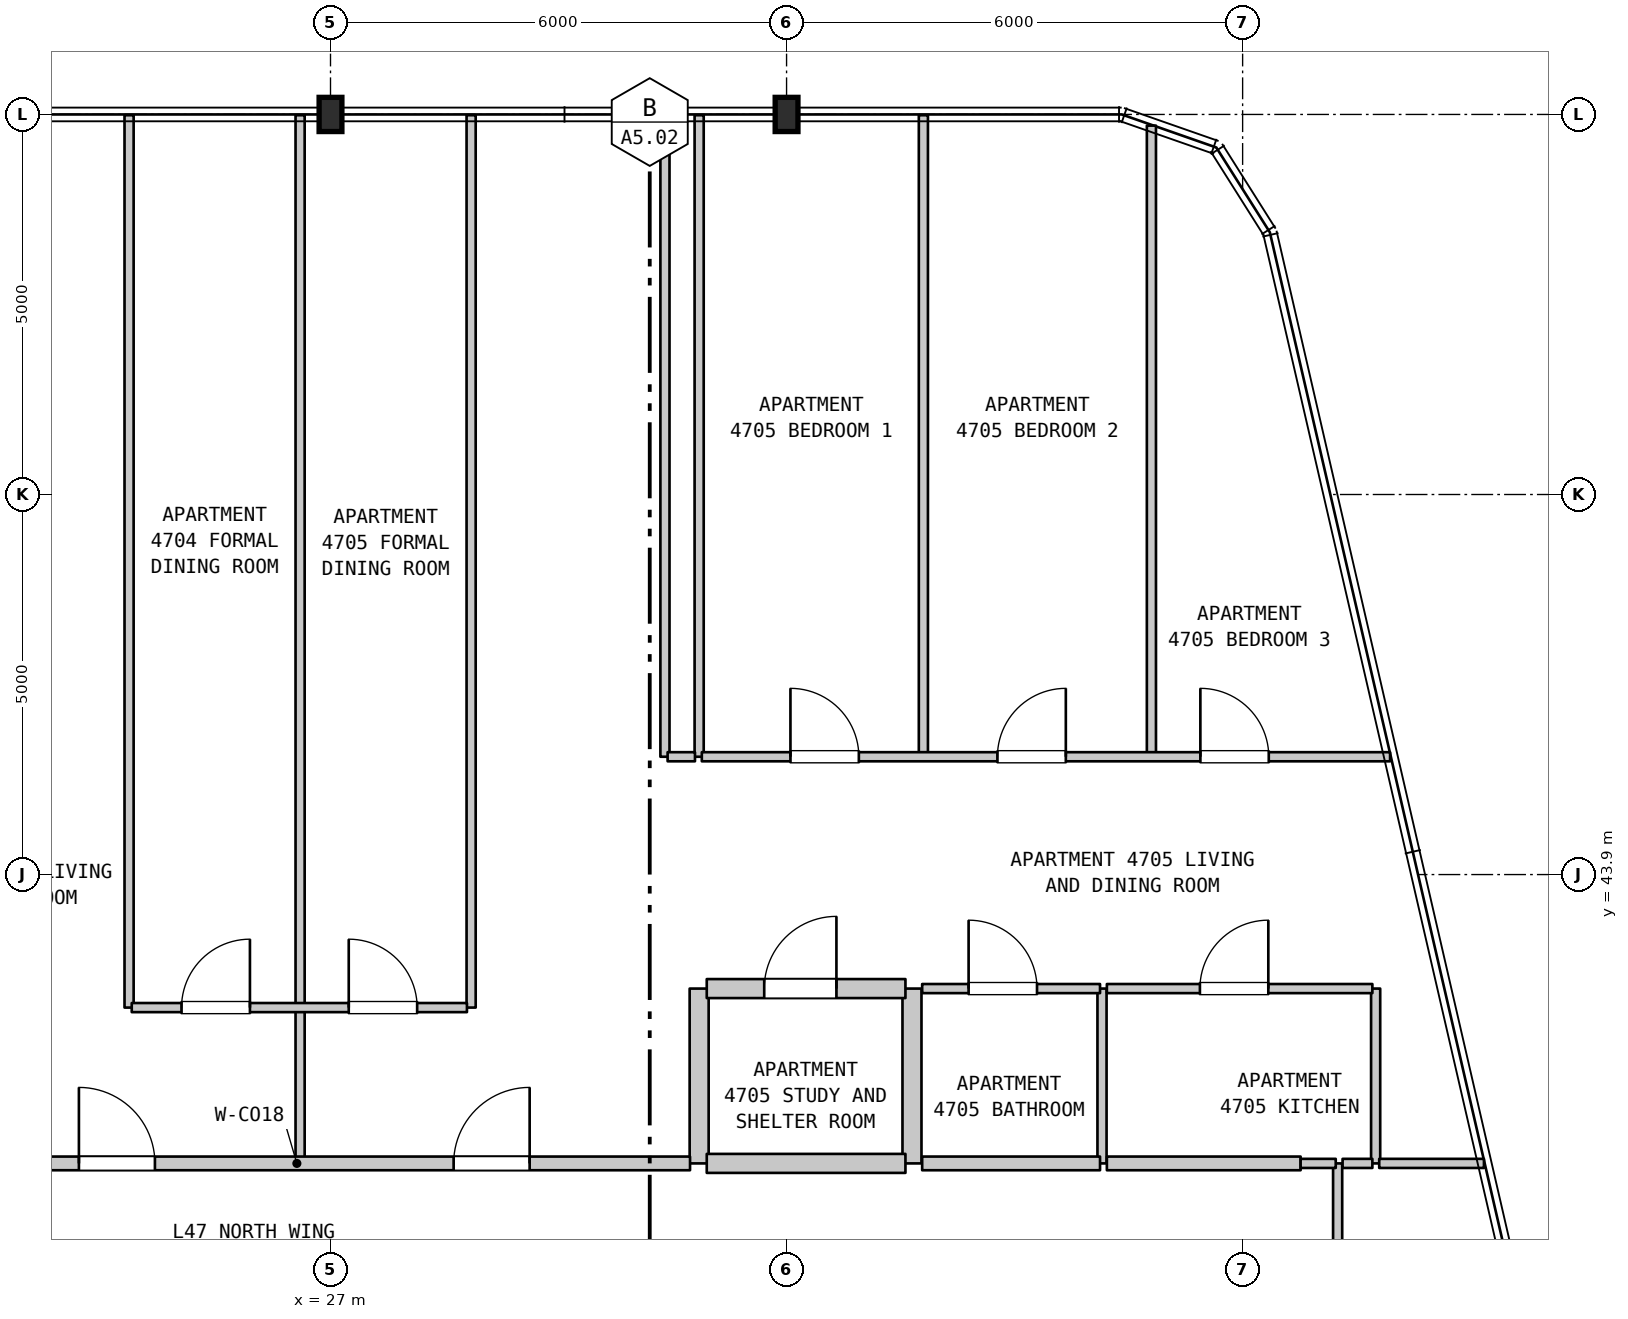
"""IFC4 building model, lengths in metres.
Left out: names, types, materials, properties, quantities, classifications, styles, units other than length and angle.
Written with IfcOpenShell. Run it as: python <this file> out.ifc"""

import sys

from ifc_helpers import new_model, si_unit, direction, frame, frame_2d, origin, origin_2d, place, context, subcontext, project, spatial, rectangle, i_section, extrude, element, fill, save


model = new_model("IFC4")
c1 = context("Model", 3, precision=1e-05, world=origin(), true_north=direction((0.0, 1.0)))
c2 = subcontext(c1, "Body", "Model", "MODEL_VIEW")
j1 = project(units=[si_unit("LENGTHUNIT", "METRE"), si_unit("PLANEANGLEUNIT", "RADIAN")], contexts=[c1])
p1 = place(None, origin())
s1 = spatial("IfcSite", under=j1, at=p1, CompositionType="ELEMENT")
p2 = place(p1, origin())
s2 = spatial("IfcBuilding", under=s1, at=p2, CompositionType="ELEMENT")
p3 = place(p2, frame((0.0, 0.0, 192.1)))
s3 = spatial("IfcBuildingStorey", under=s2, at=p3, CompositionType="ELEMENT", Elevation=192.1)
for number, where, z_axis, x_axis in (
    (1, (27.0, 53.9, 0.0), (0.0, 0.0, 1.0), (1.0, 0.0, 0.0)),
    (2, (33.0, 53.9, 0.0), (0.0, 0.0, 1.0), (1.0, 0.0, 0.0)),
):
    element("IfcColumn", number, at=place(p3, frame(where, z_axis=z_axis, x_axis=x_axis)), inside=s3, PredefinedType="COLUMN", context=c2, shape_type="SweptSolid", body=[
        extrude(i_section(OverallWidth=0.3, OverallDepth=0.45, WebThickness=0.014, FlangeThickness=0.026, FilletRadius=0.027, at=origin_2d()), origin(), (0.0, 0.0, 1.0), 3.7),
    ])
p4 = place(p3, frame((24.35, 42.15, 0.0), z_axis=(0.0, 0.0, 1.0), x_axis=(0.0, 1.0, 0.0)))
e3 = element("IfcWall", 3, at=p4, inside=s3, PredefinedType="PARTITIONING", context=c2, shape_type="SweptSolid", body=[
    extrude(rectangle(XDim=11.74, YDim=0.12, at=frame_2d((5.87, 0.0))), origin(), (0.0, 0.0, 1.0), 3.39),
])
p5 = place(p3, frame((26.6, 40.1, 0.0), z_axis=(0.0, 0.0, 1.0), x_axis=(0.0, 1.0, 0.0)))
e4 = element("IfcWall", 4, at=p5, inside=s3, PredefinedType="PARTITIONING", context=c2, shape_type="SweptSolid", body=[
    extrude(rectangle(XDim=2.05, YDim=0.12, at=frame_2d((1.025, 0.0))), origin(), (0.0, 0.0, 1.0), 3.39),
])
for number, where, z_axis, x_axis in (
    (5, (26.6, 42.15, 0.0), (0.0, 0.0, 1.0), (0.0, 1.0, 0.0)),
    (6, (28.85, 42.15, 0.0), (0.0, 0.0, 1.0), (0.0, 1.0, 0.0)),
):
    element("IfcWall", number, at=place(p3, frame(where, z_axis=z_axis, x_axis=x_axis)), inside=s3, PredefinedType="PARTITIONING", context=c2, shape_type="SweptSolid", body=[
        extrude(rectangle(XDim=11.74, YDim=0.12, at=frame_2d((5.87, 0.0))), origin(), (0.0, 0.0, 1.0), 3.39),
    ])
p6 = place(p3, frame((31.4, 45.45, 0.0), z_axis=(0.0, 0.0, 1.0), x_axis=(0.0, 1.0, 0.0)))
e7 = element("IfcWall", 7, at=p6, inside=s3, PredefinedType="PARTITIONING", context=c2, shape_type="SweptSolid", body=[
    extrude(rectangle(XDim=8.44, YDim=0.12, at=frame_2d((4.22, 0.0))), origin(), (0.0, 0.0, 1.0), 3.39),
])
p7 = place(p3, frame((31.85, 40.1, 0.0), z_axis=(0.0, 0.0, 1.0), x_axis=(0.0, 1.0, 0.0)))
e8 = element("IfcWall", 8, at=p7, inside=s3, PredefinedType="STANDARD", context=c2, shape_type="SweptSolid", body=[
    extrude(rectangle(XDim=2.3, YDim=0.25, at=frame_2d((1.15, 0.0))), origin(), (0.0, 0.0, 1.0), 3.39),
])
p8 = place(p3, frame((31.85, 45.45, 0.0), z_axis=(0.0, 0.0, 1.0), x_axis=(0.0, 1.0, 0.0)))
e9 = element("IfcWall", 9, at=p8, inside=s3, PredefinedType="PARTITIONING", context=c2, shape_type="SweptSolid", body=[
    extrude(rectangle(XDim=8.44, YDim=0.12, at=frame_2d((4.22, 0.0))), origin(), (0.0, 0.0, 1.0), 3.39),
])
p9 = place(p3, frame((34.65, 40.1, 0.0), z_axis=(0.0, 0.0, 1.0), x_axis=(0.0, 1.0, 0.0)))
e10 = element("IfcWall", 10, at=p9, inside=s3, PredefinedType="STANDARD", context=c2, shape_type="SweptSolid", body=[
    extrude(rectangle(XDim=2.3, YDim=0.25, at=frame_2d((1.15, 0.0))), origin(), (0.0, 0.0, 1.0), 3.39),
])
p10 = place(p3, frame((34.8, 45.45, 0.0), z_axis=(0.0, 0.0, 1.0), x_axis=(0.0, 1.0, 0.0)))
e11 = element("IfcWall", 11, at=p10, inside=s3, PredefinedType="PARTITIONING", context=c2, shape_type="SweptSolid", body=[
    extrude(rectangle(XDim=8.44, YDim=0.12, at=frame_2d((4.22, 0.0))), origin(), (0.0, 0.0, 1.0), 3.39),
])
p11 = place(p3, frame((37.15, 40.1, 0.0), z_axis=(0.0, 0.0, 1.0), x_axis=(0.0, 1.0, 0.0)))
e12 = element("IfcWall", 12, at=p11, inside=s3, PredefinedType="PARTITIONING", context=c2, shape_type="SweptSolid", body=[
    extrude(rectangle(XDim=2.3, YDim=0.12, at=frame_2d((1.15, 0.0))), origin(), (0.0, 0.0, 1.0), 3.39),
])
p12 = place(p3, frame((37.8, 45.45, 0.0), z_axis=(0.0, 0.0, 1.0), x_axis=(0.0, 1.0, 0.0)))
e13 = element("IfcWall", 13, at=p12, inside=s3, PredefinedType="PARTITIONING", context=c2, shape_type="SweptSolid", body=[
    extrude(rectangle(XDim=8.303, YDim=0.12, at=frame_2d((4.151, 0.0))), origin(), (0.0, 0.0, 1.0), 3.39),
])
p13 = place(p3, frame((40.25, 37.9, 0.0), z_axis=(0.0, 0.0, 1.0), x_axis=(0.0, 1.0, 0.0)))
e14 = element("IfcWall", 14, at=p13, inside=s3, PredefinedType="PARTITIONING", context=c2, shape_type="SweptSolid", body=[
    extrude(rectangle(XDim=2.2, YDim=0.12, at=frame_2d((1.1, 0.0))), origin(), (0.0, 0.0, 1.0), 3.39),
])
p14 = place(p3, frame((40.75, 40.1, 0.0), z_axis=(0.0, 0.0, 1.0), x_axis=(0.0, 1.0, 0.0)))
e15 = element("IfcWall", 15, at=p14, inside=s3, PredefinedType="PARTITIONING", context=c2, shape_type="SweptSolid", body=[
    extrude(rectangle(XDim=2.3, YDim=0.12, at=frame_2d((1.15, 0.0))), origin(), (0.0, 0.0, 1.0), 3.39),
])
p15 = place(p3, frame((21.385, 40.1, 0.0), z_axis=(0.0, 0.0, 1.0), x_axis=(1.0, 0.0, 0.0)))
e16 = element("IfcWall", 16, at=p15, inside=s3, PredefinedType="STANDARD", context=c2, shape_type="SweptSolid", body=[
    extrude(rectangle(XDim=10.345, YDim=0.18, at=frame_2d((5.172, 0.0))), origin(), (0.0, 0.0, 1.0), 3.39),
])
p16 = place(p15, frame((2.305, 0.0, 0.0)))
e17 = element("IfcOpeningElement", 17, at=p16, cuts=e16, PredefinedType="OPENING", context=c2, shape_type="SweptSolid", body=[
    extrude(rectangle(XDim=1.0, YDim=2.15, at=frame_2d((0.5, 1.075))), frame((0.0, 0.1, 0.0), z_axis=(0.0, -1.0, 0.0), x_axis=(1.0, 0.0, 0.0)), (0.0, 0.0, 1.0), 0.2),
])
p17 = place(p15, frame((7.235, 0.0, 0.0)))
e18 = element("IfcOpeningElement", 18, at=p17, cuts=e16, PredefinedType="OPENING", context=c2, shape_type="SweptSolid", body=[
    extrude(rectangle(XDim=1.0, YDim=2.15, at=frame_2d((0.5, 1.075))), frame((0.0, 0.1, 0.0), z_axis=(0.0, -1.0, 0.0), x_axis=(1.0, 0.0, 0.0)), (0.0, 0.0, 1.0), 0.2),
])
p18 = place(p3, frame((31.95, 40.1, 0.0), z_axis=(0.0, 0.0, 1.0), x_axis=(1.0, 0.0, 0.0)))
e19 = element("IfcWall", 19, at=p18, inside=s3, PredefinedType="STANDARD", context=c2, shape_type="SweptSolid", body=[
    extrude(rectangle(XDim=2.614, YDim=0.25, at=frame_2d((1.307, 0.0))), origin(), (0.0, 0.0, 1.0), 3.39),
])
p19 = place(p3, frame((34.784, 40.1, 0.0), z_axis=(0.0, 0.0, 1.0), x_axis=(1.0, 0.0, 0.0)))
e20 = element("IfcWall", 20, at=p19, inside=s3, PredefinedType="STANDARD", context=c2, shape_type="SweptSolid", body=[
    extrude(rectangle(XDim=2.34, YDim=0.18, at=frame_2d((1.17, 0.0))), origin(), (0.0, 0.0, 1.0), 3.39),
])
p20 = place(p3, frame((37.214, 40.1, 0.0), z_axis=(0.0, 0.0, 1.0), x_axis=(1.0, 0.0, 0.0)))
e21 = element("IfcWall", 21, at=p20, inside=s3, PredefinedType="STANDARD", context=c2, shape_type="SweptSolid", body=[
    extrude(rectangle(XDim=2.549, YDim=0.18, at=frame_2d((1.274, 0.0))), origin(), (0.0, 0.0, 1.0), 3.39),
])
p21 = place(p3, frame((39.763, 40.1, 0.0), z_axis=(0.0, 0.0, 1.0), x_axis=(1.0, 0.0, 0.0)))
e22 = element("IfcWall", 22, at=p21, inside=s3, PredefinedType="PARTITIONING", context=c2, shape_type="SweptSolid", body=[
    extrude(rectangle(XDim=0.462, YDim=0.12, at=frame_2d((0.231, 0.0))), origin(), (0.0, 0.0, 1.0), 3.39),
])
p22 = place(p3, frame((40.315, 40.1, 0.0), z_axis=(0.0, 0.0, 1.0), x_axis=(1.0, 0.0, 0.0)))
e23 = element("IfcWall", 23, at=p22, inside=s3, PredefinedType="PARTITIONING", context=c2, shape_type="SweptSolid", body=[
    extrude(rectangle(XDim=0.392, YDim=0.12, at=frame_2d((0.196, 0.0))), origin(), (0.0, 0.0, 1.0), 3.39),
])
p23 = place(p3, frame((40.797, 40.1, 0.0), z_axis=(0.0, 0.0, 1.0), x_axis=(1.0, 0.0, 0.0)))
e24 = element("IfcWall", 24, at=p23, inside=s3, PredefinedType="PARTITIONING", context=c2, shape_type="SweptSolid", body=[
    extrude(rectangle(XDim=1.378, YDim=0.12, at=frame_2d((0.689, 0.0))), origin(), (0.0, 0.0, 1.0), 3.39),
])
p24 = place(p3, frame((24.385, 42.15, 0.0), z_axis=(0.0, 0.0, 1.0), x_axis=(1.0, 0.0, 0.0)))
e25 = element("IfcWall", 25, at=p24, inside=s3, PredefinedType="PARTITIONING", context=c2, shape_type="SweptSolid", body=[
    extrude(rectangle(XDim=4.41, YDim=0.12, at=frame_2d((2.205, 0.0))), origin(), (0.0, 0.0, 1.0), 3.39),
])
p25 = place(p24, frame((0.655, 0.0, 0.0)))
e26 = element("IfcOpeningElement", 26, at=p25, cuts=e25, PredefinedType="OPENING", context=c2, shape_type="SweptSolid", body=[
    extrude(rectangle(XDim=0.9, YDim=2.15, at=frame_2d((0.45, 1.075))), frame((0.0, 0.07, 0.0), z_axis=(0.0, -1.0, 0.0), x_axis=(1.0, 0.0, 0.0)), (0.0, 0.0, 1.0), 0.14),
])
p26 = place(p24, frame((2.855, 0.0, 0.0)))
e27 = element("IfcOpeningElement", 27, at=p26, cuts=e25, PredefinedType="OPENING", context=c2, shape_type="SweptSolid", body=[
    extrude(rectangle(XDim=0.9, YDim=2.15, at=frame_2d((0.45, 1.075))), frame((0.0, 0.07, 0.0), z_axis=(0.0, -1.0, 0.0), x_axis=(1.0, 0.0, 0.0)), (0.0, 0.0, 1.0), 0.14),
])
p27 = place(p3, frame((31.95, 42.4, 0.0), z_axis=(0.0, 0.0, 1.0), x_axis=(1.0, 0.0, 0.0)))
e28 = element("IfcWall", 28, at=p27, inside=s3, PredefinedType="STANDARD", context=c2, shape_type="SweptSolid", body=[
    extrude(rectangle(XDim=2.614, YDim=0.25, at=frame_2d((1.307, 0.0))), origin(), (0.0, 0.0, 1.0), 3.39),
])
p28 = place(p27, frame((0.756, 0.0, 0.0)))
e29 = element("IfcOpeningElement", 29, at=p28, cuts=e28, PredefinedType="OPENING", context=c2, shape_type="SweptSolid", body=[
    extrude(rectangle(XDim=0.95, YDim=2.15, at=frame_2d((0.475, 1.075))), frame((0.0, 0.135, 0.0), z_axis=(0.0, -1.0, 0.0), x_axis=(1.0, 0.0, 0.0)), (0.0, 0.0, 1.0), 0.27),
])
p29 = place(p3, frame((34.784, 42.4, 0.0), z_axis=(0.0, 0.0, 1.0), x_axis=(1.0, 0.0, 0.0)))
e30 = element("IfcWall", 30, at=p29, inside=s3, PredefinedType="PARTITIONING", context=c2, shape_type="SweptSolid", body=[
    extrude(rectangle(XDim=2.34, YDim=0.12, at=frame_2d((1.17, 0.0))), origin(), (0.0, 0.0, 1.0), 3.39),
])
p30 = place(p29, frame((0.611, 0.0, 0.0)))
e31 = element("IfcOpeningElement", 31, at=p30, cuts=e30, PredefinedType="OPENING", context=c2, shape_type="SweptSolid", body=[
    extrude(rectangle(XDim=0.9, YDim=2.1, at=frame_2d((0.45, 1.05))), frame((0.0, 0.07, 0.0), z_axis=(0.0, -1.0, 0.0), x_axis=(1.0, 0.0, 0.0)), (0.0, 0.0, 1.0), 0.14),
])
p31 = place(p3, frame((37.214, 42.4, 0.0), z_axis=(0.0, 0.0, 1.0), x_axis=(1.0, 0.0, 0.0)))
e32 = element("IfcWall", 32, at=p31, inside=s3, PredefinedType="PARTITIONING", context=c2, shape_type="SweptSolid", body=[
    extrude(rectangle(XDim=3.493, YDim=0.12, at=frame_2d((1.747, 0.0))), origin(), (0.0, 0.0, 1.0), 3.39),
])
p32 = place(p31, frame((1.224, 0.0, 0.0)))
e33 = element("IfcOpeningElement", 33, at=p32, cuts=e32, PredefinedType="OPENING", context=c2, shape_type="SweptSolid", body=[
    extrude(rectangle(XDim=0.9, YDim=2.15, at=frame_2d((0.45, 1.075))), frame((0.0, 0.07, 0.0), z_axis=(0.0, -1.0, 0.0), x_axis=(1.0, 0.0, 0.0)), (0.0, 0.0, 1.0), 0.14),
])
p33 = place(p3, frame((31.435, 45.45, 0.0), z_axis=(0.0, 0.0, 1.0), x_axis=(1.0, 0.0, 0.0)))
e34 = element("IfcWall", 34, at=p33, inside=s3, PredefinedType="PARTITIONING", context=c2, shape_type="SweptSolid", body=[
    extrude(rectangle(XDim=0.36, YDim=0.12, at=frame_2d((0.18, 0.0))), origin(), (0.0, 0.0, 1.0), 3.39),
])
p34 = place(p3, frame((31.885, 45.45, 0.0), z_axis=(0.0, 0.0, 1.0), x_axis=(1.0, 0.0, 0.0)))
e35 = element("IfcWall", 35, at=p34, inside=s3, PredefinedType="PARTITIONING", context=c2, shape_type="SweptSolid", body=[
    extrude(rectangle(XDim=9.055, YDim=0.12, at=frame_2d((4.527, 0.0))), origin(), (0.0, 0.0, 1.0), 3.39),
])
p35 = place(p34, frame((1.166, 0.0, 0.0)))
e36 = element("IfcOpeningElement", 36, at=p35, cuts=e35, PredefinedType="OPENING", context=c2, shape_type="SweptSolid", body=[
    extrude(rectangle(XDim=0.9, YDim=2.15, at=frame_2d((0.45, 1.075))), frame((0.0, 0.07, 0.0), z_axis=(0.0, -1.0, 0.0), x_axis=(1.0, 0.0, 0.0)), (0.0, 0.0, 1.0), 0.14),
])
p36 = place(p34, frame((3.889, 0.0, 0.0)))
e37 = element("IfcOpeningElement", 37, at=p36, cuts=e35, PredefinedType="OPENING", context=c2, shape_type="SweptSolid", body=[
    extrude(rectangle(XDim=0.9, YDim=2.15, at=frame_2d((0.45, 1.075))), frame((0.0, 0.07, 0.0), z_axis=(0.0, -1.0, 0.0), x_axis=(1.0, 0.0, 0.0)), (0.0, 0.0, 1.0), 0.14),
])
p37 = place(p34, frame((6.559, 0.0, 0.0)))
e38 = element("IfcOpeningElement", 38, at=p37, cuts=e35, PredefinedType="OPENING", context=c2, shape_type="SweptSolid", body=[
    extrude(rectangle(XDim=0.9, YDim=2.15, at=frame_2d((0.45, 1.075))), frame((0.0, 0.07, 0.0), z_axis=(0.0, -1.0, 0.0), x_axis=(1.0, 0.0, 0.0)), (0.0, 0.0, 1.0), 0.14),
])
p38 = place(p16, origin())
e39 = element("IfcDoor", 39, at=p38, inside=s3, OperationType="SINGLE_SWING_LEFT", PredefinedType="DOOR", context=c2, shape_type="SweptSolid", body=[
    extrude(rectangle(XDim=1.0, YDim=2.15, at=frame_2d((0.5, 1.075))), frame((0.0, 0.025, 0.0), z_axis=(0.0, -1.0, 0.0), x_axis=(1.0, 0.0, 0.0)), (0.0, 0.0, 1.0), 0.05),
])
fill(e17, e39)
p39 = place(p17, origin())
e40 = element("IfcDoor", 40, at=p39, inside=s3, OperationType="SINGLE_SWING_RIGHT", PredefinedType="DOOR", context=c2, shape_type="SweptSolid", body=[
    extrude(rectangle(XDim=1.0, YDim=2.15, at=frame_2d((0.5, 1.075))), frame((0.0, 0.025, 0.0), z_axis=(0.0, -1.0, 0.0), x_axis=(1.0, 0.0, 0.0)), (0.0, 0.0, 1.0), 0.05),
])
fill(e18, e40)
p40 = place(p25, origin())
e41 = element("IfcDoor", 41, at=p40, inside=s3, OperationType="SINGLE_SWING_RIGHT", PredefinedType="DOOR", context=c2, shape_type="SweptSolid", body=[
    extrude(rectangle(XDim=0.9, YDim=2.15, at=frame_2d((0.45, 1.075))), frame((0.0, 0.025, 0.0), z_axis=(0.0, -1.0, 0.0), x_axis=(1.0, 0.0, 0.0)), (0.0, 0.0, 1.0), 0.05),
])
fill(e26, e41)
p41 = place(p26, origin())
e42 = element("IfcDoor", 42, at=p41, inside=s3, OperationType="SINGLE_SWING_LEFT", PredefinedType="DOOR", context=c2, shape_type="SweptSolid", body=[
    extrude(rectangle(XDim=0.9, YDim=2.15, at=frame_2d((0.45, 1.075))), frame((0.0, 0.025, 0.0), z_axis=(0.0, -1.0, 0.0), x_axis=(1.0, 0.0, 0.0)), (0.0, 0.0, 1.0), 0.05),
])
fill(e27, e42)
p42 = place(p28, origin())
e43 = element("IfcDoor", 43, at=p42, inside=s3, OperationType="SINGLE_SWING_RIGHT", PredefinedType="DOOR", context=c2, shape_type="SweptSolid", body=[
    extrude(rectangle(XDim=0.95, YDim=2.15, at=frame_2d((0.475, 1.075))), frame((0.0, 0.025, 0.0), z_axis=(0.0, -1.0, 0.0), x_axis=(1.0, 0.0, 0.0)), (0.0, 0.0, 1.0), 0.05),
])
fill(e29, e43)
p43 = place(p30, origin())
e44 = element("IfcDoor", 44, at=p43, inside=s3, OperationType="SINGLE_SWING_LEFT", PredefinedType="DOOR", context=c2, shape_type="SweptSolid", body=[
    extrude(rectangle(XDim=0.9, YDim=2.1, at=frame_2d((0.45, 1.05))), frame((0.0, 0.025, 0.0), z_axis=(0.0, -1.0, 0.0), x_axis=(1.0, 0.0, 0.0)), (0.0, 0.0, 1.0), 0.05),
])
fill(e31, e44)
p44 = place(p32, origin())
e45 = element("IfcDoor", 45, at=p44, inside=s3, OperationType="SINGLE_SWING_RIGHT", PredefinedType="DOOR", context=c2, shape_type="SweptSolid", body=[
    extrude(rectangle(XDim=0.9, YDim=2.15, at=frame_2d((0.45, 1.075))), frame((0.0, 0.025, 0.0), z_axis=(0.0, -1.0, 0.0), x_axis=(1.0, 0.0, 0.0)), (0.0, 0.0, 1.0), 0.05),
])
fill(e33, e45)
p45 = place(p35, origin())
e46 = element("IfcDoor", 46, at=p45, inside=s3, OperationType="SINGLE_SWING_LEFT", PredefinedType="DOOR", context=c2, shape_type="SweptSolid", body=[
    extrude(rectangle(XDim=0.9, YDim=2.15, at=frame_2d((0.45, 1.075))), frame((0.0, 0.025, 0.0), z_axis=(0.0, -1.0, 0.0), x_axis=(1.0, 0.0, 0.0)), (0.0, 0.0, 1.0), 0.05),
])
fill(e36, e46)
p46 = place(p36, origin())
e47 = element("IfcDoor", 47, at=p46, inside=s3, OperationType="SINGLE_SWING_RIGHT", PredefinedType="DOOR", context=c2, shape_type="SweptSolid", body=[
    extrude(rectangle(XDim=0.9, YDim=2.15, at=frame_2d((0.45, 1.075))), frame((0.0, 0.025, 0.0), z_axis=(0.0, -1.0, 0.0), x_axis=(1.0, 0.0, 0.0)), (0.0, 0.0, 1.0), 0.05),
])
fill(e37, e47)
p47 = place(p37, origin())
e48 = element("IfcDoor", 48, at=p47, inside=s3, OperationType="SINGLE_SWING_LEFT", PredefinedType="DOOR", context=c2, shape_type="SweptSolid", body=[
    extrude(rectangle(XDim=0.9, YDim=2.15, at=frame_2d((0.45, 1.075))), frame((0.0, 0.025, 0.0), z_axis=(0.0, -1.0, 0.0), x_axis=(1.0, 0.0, 0.0)), (0.0, 0.0, 1.0), 0.05),
])
fill(e38, e48)
save(model, sys.argv[1])
